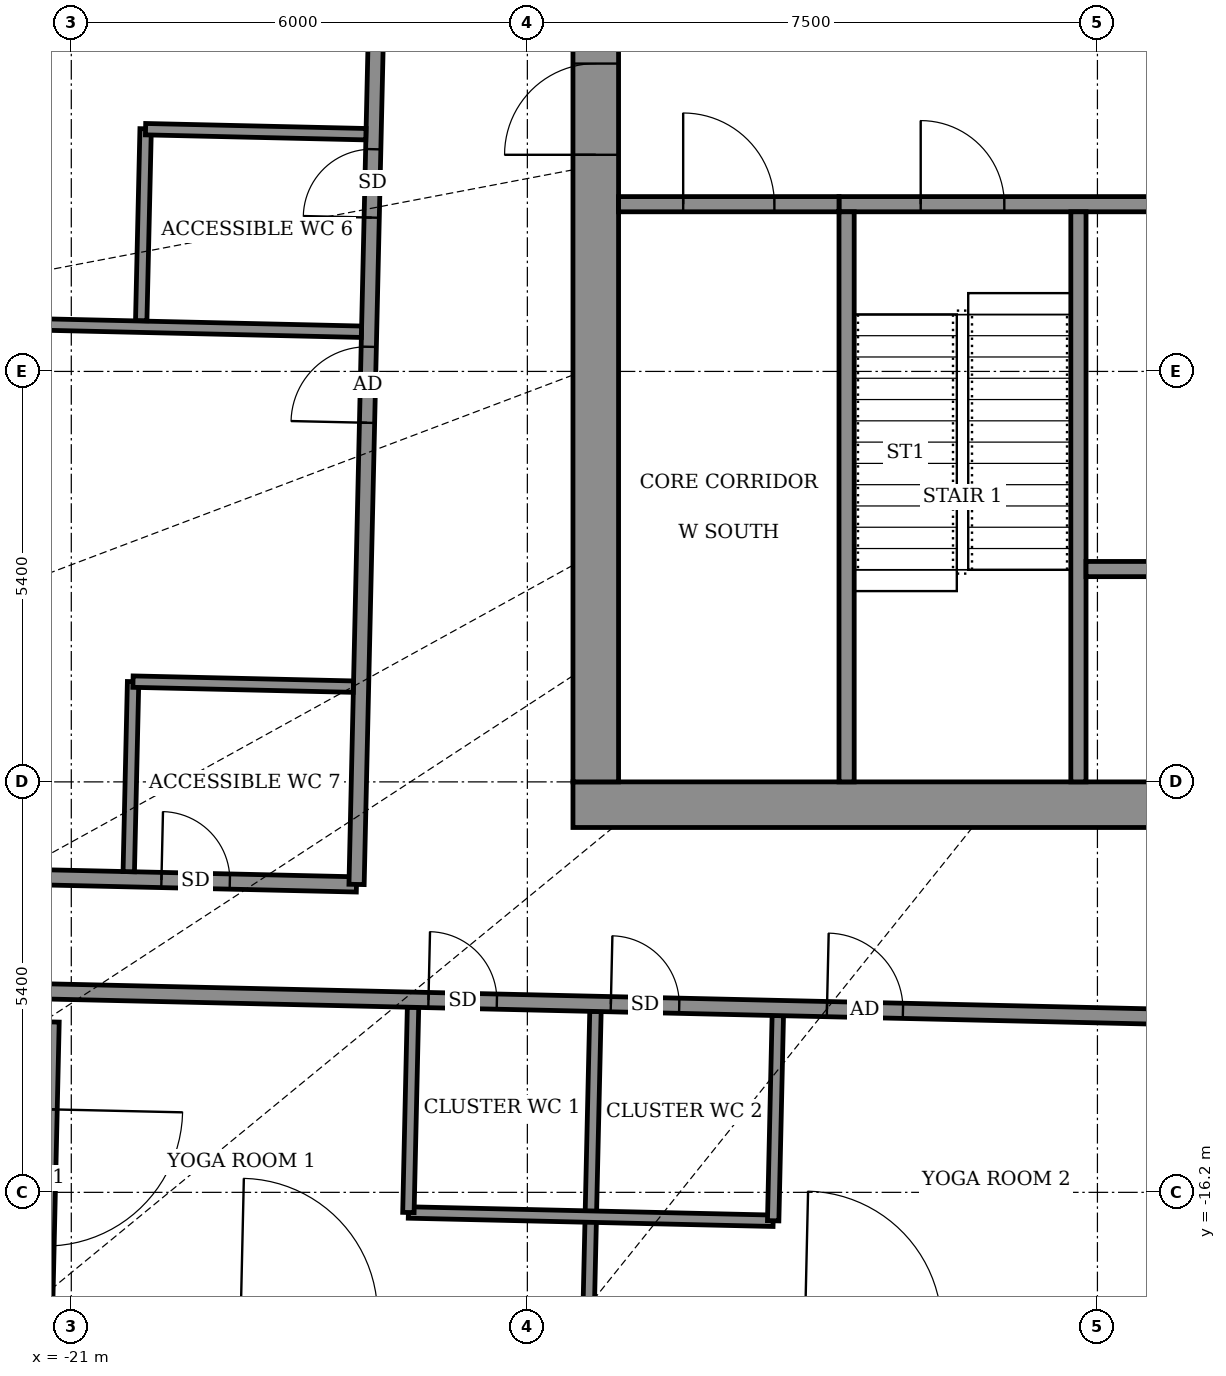
"""IFC4 building model, lengths in metres.
Left out: names, types, materials, properties, quantities, classifications, styles, units other than length and angle.
Written with IfcOpenShell. Run it as: python <this file> out.ifc"""

import sys

from ifc_helpers import new_model, si_unit, direction, frame, frame_2d, origin, place, context, subcontext, project, spatial, rectangle, extrude, element, fill, save


model = new_model("IFC4")
c1 = context("Model", 3, precision=1e-05, world=origin(), true_north=direction((0.0, 1.0)))
c2 = subcontext(c1, "Body", "Model", "MODEL_VIEW")
j1 = project(units=[si_unit("LENGTHUNIT", "METRE"), si_unit("PLANEANGLEUNIT", "RADIAN")], contexts=[c1])
p1 = place(None, origin())
s1 = spatial("IfcSite", under=j1, at=p1, CompositionType="ELEMENT")
p2 = place(p1, origin())
s2 = spatial("IfcBuilding", under=s1, at=p2, CompositionType="ELEMENT")
p3 = place(p2, frame((0.0, 0.0, 337.9)))
s3 = spatial("IfcBuildingStorey", under=s2, at=p3, CompositionType="ELEMENT", Elevation=337.9)
p4 = place(p3, frame((-21.309, -13.957, 0.0), z_axis=(0.0, 0.0, 1.0), x_axis=(-0.022614868993, -0.999744251146, 0.0)))
e1 = element("IfcWall", 1, at=p4, inside=s3, PredefinedType="SOLIDWALL", context=c2, shape_type="SweptSolid", body=[
    extrude(rectangle(XDim=3.8, YDim=0.3, at=frame_2d((1.9, 0.0))), origin(), (0.0, 0.0, 1.0), 2.65),
])
p5 = place(p4, frame((1.15, 0.0, 0.0)))
e2 = element("IfcOpeningElement", 2, at=p5, cuts=e1, PredefinedType="OPENING", context=c2, shape_type="SweptSolid", body=[
    extrude(rectangle(XDim=1.8, YDim=2.4, at=frame_2d((0.9, 1.2))), frame((0.0, 0.16, 0.0), z_axis=(0.0, -1.0, 0.0), x_axis=(1.0, 0.0, 0.0)), (0.0, 0.0, 1.0), 0.32),
])
p6 = place(p3, frame((-14.194, -17.769, 0.0), z_axis=(0.0, 0.0, 1.0), x_axis=(0.022807049009, 0.999739885428, 0.0)))
e3 = element("IfcWall", 3, at=p6, inside=s3, PredefinedType="PARTITIONING", context=c2, shape_type="SweptSolid", body=[
    extrude(rectangle(XDim=3.95, YDim=0.15, at=frame_2d((1.975, 0.0))), origin(), (0.0, 0.0, 1.0), 2.85),
])
p7 = place(p3, frame((-16.565, -16.465, 0.0), z_axis=(0.0, 0.0, 1.0), x_axis=(0.999742675121, -0.022684433919, 0.0)))
e4 = element("IfcWall", 4, at=p7, inside=s3, PredefinedType="PARTITIONING", context=c2, shape_type="SweptSolid", body=[
    extrude(rectangle(XDim=4.8, YDim=0.15, at=frame_2d((2.4, 0.0))), origin(), (0.0, 0.0, 1.0), 2.85),
])
p8 = place(p3, frame((-16.565, -16.465, 0.0), z_axis=(0.0, 0.0, 1.0), x_axis=(0.02260842146, 0.999744396973, 0.0)))
e5 = element("IfcWall", 5, at=p8, inside=s3, PredefinedType="PARTITIONING", context=c2, shape_type="SweptSolid", body=[
    extrude(rectangle(XDim=2.7, YDim=0.15, at=frame_2d((1.35, 0.0))), origin(), (0.0, 0.0, 1.0), 2.65),
])
p9 = place(p3, frame((-11.766, -16.574, 0.0), z_axis=(0.0, 0.0, 1.0), x_axis=(0.02260842146, 0.999744396973, 0.0)))
e6 = element("IfcWall", 6, at=p9, inside=s3, PredefinedType="PARTITIONING", context=c2, shape_type="SweptSolid", body=[
    extrude(rectangle(XDim=2.7, YDim=0.15, at=frame_2d((1.35, 0.0))), origin(), (0.0, 0.0, 1.0), 2.85),
])
p10 = place(p3, frame((-23.849, -13.499, 0.0), z_axis=(0.0, 0.0, 1.0), x_axis=(0.999742429398, -0.022695260756, 0.0)))
e7 = element("IfcWall", 7, at=p10, inside=s3, PredefinedType="PARTITIONING", context=c2, shape_type="SweptSolid", body=[
    extrude(rectangle(XDim=49.0, YDim=0.2, at=frame_2d((24.5, 0.0))), origin(), (0.0, 0.0, 1.0), 2.45),
])
p11 = place(p10, frame((7.55, 0.0, 0.0)))
e8 = element("IfcOpeningElement", 8, at=p11, cuts=e7, PredefinedType="OPENING", context=c2, shape_type="SweptSolid", body=[
    extrude(rectangle(XDim=0.9, YDim=2.1, at=frame_2d((0.45, 1.05))), frame((0.0, 0.11, 0.0), z_axis=(0.0, -1.0, 0.0), x_axis=(1.0, 0.0, 0.0)), (0.0, 0.0, 1.0), 0.22),
])
p12 = place(p10, frame((12.794, 0.0, 0.0)))
e9 = element("IfcOpeningElement", 9, at=p12, cuts=e7, PredefinedType="OPENING", context=c2, shape_type="SweptSolid", body=[
    extrude(rectangle(XDim=1.0, YDim=2.1, at=frame_2d((0.5, 1.05))), frame((0.0, 0.11, 0.0), z_axis=(0.0, -1.0, 0.0), x_axis=(1.0, 0.0, 0.0)), (0.0, 0.0, 1.0), 0.22),
])
p13 = place(p10, frame((9.95, 0.0, 0.0)))
e10 = element("IfcOpeningElement", 10, at=p13, cuts=e7, PredefinedType="OPENING", context=c2, shape_type="SweptSolid", body=[
    extrude(rectangle(XDim=0.9, YDim=2.1, at=frame_2d((0.45, 1.05))), frame((0.0, 0.11, 0.0), z_axis=(0.0, -1.0, 0.0), x_axis=(1.0, 0.0, 0.0)), (0.0, 0.0, 1.0), 0.22),
])
p14 = place(p10, frame((17.45, 0.0, 0.0)))
e11 = element("IfcOpeningElement", 11, at=p14, cuts=e7, PredefinedType="OPENING", context=c2, shape_type="SweptSolid", body=[
    extrude(rectangle(XDim=1.0, YDim=2.1, at=frame_2d((0.5, 1.05))), frame((0.0, 0.11, 0.0), z_axis=(0.0, -1.0, 0.0), x_axis=(1.0, 0.0, 0.0)), (0.0, 0.0, 1.0), 0.22),
])
p15 = place(p10, frame((23.149, 0.0, 0.0)))
e12 = element("IfcOpeningElement", 12, at=p15, cuts=e7, PredefinedType="OPENING", context=c2, shape_type="SweptSolid", body=[
    extrude(rectangle(XDim=1.0, YDim=2.1, at=frame_2d((0.5, 1.05))), frame((0.0, 0.11, 0.0), z_axis=(0.0, -1.0, 0.0), x_axis=(1.0, 0.0, 0.0)), (0.0, 0.0, 1.0), 0.22),
])
p16 = place(p10, frame((29.1, 0.0, 0.0)))
e13 = element("IfcOpeningElement", 13, at=p16, cuts=e7, PredefinedType="OPENING", context=c2, shape_type="SweptSolid", body=[
    extrude(rectangle(XDim=1.0, YDim=2.1, at=frame_2d((0.5, 1.05))), frame((0.0, 0.11, 0.0), z_axis=(0.0, -1.0, 0.0), x_axis=(1.0, 0.0, 0.0)), (0.0, 0.0, 1.0), 0.22),
])
p17 = place(p10, frame((32.5, 0.0, 0.0)))
e14 = element("IfcOpeningElement", 14, at=p17, cuts=e7, PredefinedType="OPENING", context=c2, shape_type="SweptSolid", body=[
    extrude(rectangle(XDim=0.9, YDim=2.1, at=frame_2d((0.45, 1.05))), frame((0.0, 0.11, 0.0), z_axis=(0.0, -1.0, 0.0), x_axis=(1.0, 0.0, 0.0)), (0.0, 0.0, 1.0), 0.22),
])
p18 = place(p10, frame((37.5, 0.0, 0.0)))
e15 = element("IfcOpeningElement", 15, at=p18, cuts=e7, PredefinedType="OPENING", context=c2, shape_type="SweptSolid", body=[
    extrude(rectangle(XDim=1.0, YDim=2.1, at=frame_2d((0.5, 1.05))), frame((0.0, 0.11, 0.0), z_axis=(0.0, -1.0, 0.0), x_axis=(1.0, 0.0, 0.0)), (0.0, 0.0, 1.0), 0.22),
])
p19 = place(p10, frame((34.9, 0.0, 0.0)))
e16 = element("IfcOpeningElement", 16, at=p19, cuts=e7, PredefinedType="OPENING", context=c2, shape_type="SweptSolid", body=[
    extrude(rectangle(XDim=0.9, YDim=2.1, at=frame_2d((0.45, 1.05))), frame((0.0, 0.11, 0.0), z_axis=(0.0, -1.0, 0.0), x_axis=(1.0, 0.0, 0.0)), (0.0, 0.0, 1.0), 0.22),
])
p20 = place(p10, frame((44.213, 0.0, 0.0)))
e17 = element("IfcOpeningElement", 17, at=p20, cuts=e7, PredefinedType="OPENING", context=c2, shape_type="SweptSolid", body=[
    extrude(rectangle(XDim=1.0, YDim=2.1, at=frame_2d((0.5, 1.05))), frame((0.0, 0.11, 0.0), z_axis=(0.0, -1.0, 0.0), x_axis=(1.0, 0.0, 0.0)), (0.0, 0.0, 1.0), 0.22),
])
p21 = place(p10, frame((40.55, 0.0, 0.0)))
e18 = element("IfcOpeningElement", 18, at=p21, cuts=e7, PredefinedType="OPENING", context=c2, shape_type="SweptSolid", body=[
    extrude(rectangle(XDim=0.9, YDim=2.1, at=frame_2d((0.45, 1.05))), frame((0.0, 0.11, 0.0), z_axis=(0.0, -1.0, 0.0), x_axis=(1.0, 0.0, 0.0)), (0.0, 0.0, 1.0), 0.22),
])
p22 = place(p3, frame((-23.815, -12.0, 0.0), z_axis=(0.0, 0.0, 1.0), x_axis=(0.999742947273, -0.022672436532, 0.0)))
e19 = element("IfcWall", 19, at=p22, inside=s3, PredefinedType="PARTITIONING", context=c2, shape_type="SweptSolid", body=[
    extrude(rectangle(XDim=6.569, YDim=0.2, at=frame_2d((3.284, 0.0))), origin(), (0.0, 0.0, 1.0), 2.45),
])
p23 = place(p22, frame((4.002, 0.0, 0.0)))
e20 = element("IfcOpeningElement", 20, at=p23, cuts=e19, PredefinedType="OPENING", context=c2, shape_type="SweptSolid", body=[
    extrude(rectangle(XDim=0.9, YDim=2.1, at=frame_2d((0.45, 1.05))), frame((0.0, 0.11, 0.0), z_axis=(0.0, -1.0, 0.0), x_axis=(1.0, 0.0, 0.0)), (0.0, 0.0, 1.0), 0.22),
])
p24 = place(p3, frame((-20.244, -11.981, 0.0), z_axis=(0.0, 0.0, 1.0), x_axis=(0.02274801823, 0.999741230352, 0.0)))
e21 = element("IfcWall", 21, at=p24, inside=s3, PredefinedType="PARTITIONING", context=c2, shape_type="SweptSolid", body=[
    extrude(rectangle(XDim=2.501, YDim=0.15, at=frame_2d((1.25, 0.0))), origin(), (0.0, 0.0, 1.0), 2.45),
])
p25 = place(p3, frame((-17.247, -12.149, 0.0), z_axis=(0.0, 0.0, 1.0), x_axis=(0.022696191528, 0.999742408268, 0.0)))
e22 = element("IfcWall", 22, at=p25, inside=s3, PredefinedType="PARTITIONING", context=c2, shape_type="SweptSolid", body=[
    extrude(rectangle(XDim=25.074, YDim=0.2, at=frame_2d((12.537, 0.0))), origin(), (0.0, 0.0, 1.0), 2.45),
])
p26 = place(p25, frame((19.097, 0.0, 0.0)))
e23 = element("IfcOpeningElement", 23, at=p26, cuts=e22, PredefinedType="OPENING", context=c2, shape_type="SweptSolid", body=[
    extrude(rectangle(XDim=1.0, YDim=2.1, at=frame_2d((0.5, 1.05))), frame((0.0, 0.11, 0.0), z_axis=(0.0, -1.0, 0.0), x_axis=(1.0, 0.0, 0.0)), (0.0, 0.0, 1.0), 0.22),
])
p27 = place(p25, frame((12.875, 0.0, 0.0)))
e24 = element("IfcOpeningElement", 24, at=p27, cuts=e22, PredefinedType="OPENING", context=c2, shape_type="SweptSolid", body=[
    extrude(rectangle(XDim=1.0, YDim=2.1, at=frame_2d((0.5, 1.05))), frame((0.0, 0.11, 0.0), z_axis=(0.0, -1.0, 0.0), x_axis=(1.0, 0.0, 0.0)), (0.0, 0.0, 1.0), 0.22),
])
p28 = place(p25, frame((8.775, 0.0, 0.0)))
e25 = element("IfcOpeningElement", 25, at=p28, cuts=e22, PredefinedType="OPENING", context=c2, shape_type="SweptSolid", body=[
    extrude(rectangle(XDim=0.9, YDim=2.1, at=frame_2d((0.45, 1.05))), frame((0.0, 0.11, 0.0), z_axis=(0.0, -1.0, 0.0), x_axis=(1.0, 0.0, 0.0)), (0.0, 0.0, 1.0), 0.22),
])
p29 = place(p25, frame((6.075, 0.0, 0.0)))
e26 = element("IfcOpeningElement", 26, at=p29, cuts=e22, PredefinedType="OPENING", context=c2, shape_type="SweptSolid", body=[
    extrude(rectangle(XDim=1.0, YDim=2.1, at=frame_2d((0.5, 1.05))), frame((0.0, 0.11, 0.0), z_axis=(0.0, -1.0, 0.0), x_axis=(1.0, 0.0, 0.0)), (0.0, 0.0, 1.0), 0.22),
])
p30 = place(p3, frame((-20.188, -9.481, 0.0), z_axis=(0.0, 0.0, 1.0), x_axis=(0.999739657619, -0.022817032779, 0.0)))
e27 = element("IfcWall", 27, at=p30, inside=s3, PredefinedType="PARTITIONING", context=c2, shape_type="SweptSolid", body=[
    extrude(rectangle(XDim=2.9, YDim=0.15, at=frame_2d((1.45, 0.0))), origin(), (0.0, 0.0, 1.0), 2.45),
])
p31 = place(p3, frame((-24.75, -4.706, 0.0), z_axis=(0.0, 0.0, 1.0), x_axis=(0.999742135204, -0.022708216532, 0.0)))
e28 = element("IfcWall", 28, at=p31, inside=s3, PredefinedType="PARTITIONING", context=c2, shape_type="SweptSolid", body=[
    extrude(rectangle(XDim=7.569, YDim=0.15, at=frame_2d((3.784, 0.0))), origin(), (0.0, 0.0, 1.0), 2.65),
])
p32 = place(p3, frame((-20.08, -4.732, 0.0), z_axis=(0.0, 0.0, 1.0), x_axis=(0.023015762656, 0.999735102249, 0.0)))
e29 = element("IfcWall", 29, at=p32, inside=s3, PredefinedType="PARTITIONING", context=c2, shape_type="SweptSolid", body=[
    extrude(rectangle(XDim=2.525, YDim=0.15, at=frame_2d((1.262, 0.0))), origin(), (0.0, 0.0, 1.0), 2.65),
])
p33 = place(p3, frame((-20.023, -2.213, 0.0), z_axis=(0.0, 0.0, 1.0), x_axis=(0.999739657619, -0.022817032779, 0.0)))
e30 = element("IfcWall", 30, at=p33, inside=s3, PredefinedType="PARTITIONING", context=c2, shape_type="SweptSolid", body=[
    extrude(rectangle(XDim=2.9, YDim=0.15, at=frame_2d((1.45, 0.0))), origin(), (0.0, 0.0, 1.0), 4.05),
])
p34 = place(p3, frame((-14.4, -11.1, 0.0), z_axis=(0.0, 0.0, 1.0), x_axis=(1.0, 0.0, 0.0)))
e31 = element("IfcWall", 31, at=p34, inside=s3, PredefinedType="SHEAR", context=c2, shape_type="SweptSolid", body=[
    extrude(rectangle(XDim=28.8, YDim=0.6, at=frame_2d((14.4, 0.0))), origin(), (0.0, 0.0, 1.0), 4.6),
])
p35 = place(p3, frame((-14.1, -10.8, 0.0), z_axis=(0.0, 0.0, 1.0), x_axis=(0.0, 1.0, 0.0)))
e32 = element("IfcWall", 32, at=p35, inside=s3, PredefinedType="SHEAR", context=c2, shape_type="SweptSolid", body=[
    extrude(rectangle(XDim=21.6, YDim=0.6, at=frame_2d((10.8, 0.0))), origin(), (0.0, 0.0, 1.0), 4.6),
])
p36 = place(p35, frame((8.25, 0.0, 0.0)))
e33 = element("IfcOpeningElement", 33, at=p36, cuts=e32, PredefinedType="OPENING", context=c2, shape_type="SweptSolid", body=[
    extrude(rectangle(XDim=1.2, YDim=2.1, at=frame_2d((0.6, 1.05))), frame((0.0, 0.31, 0.0), z_axis=(0.0, -1.0, 0.0), x_axis=(1.0, 0.0, 0.0)), (0.0, 0.0, 1.0), 0.62),
])
p37 = place(p35, frame((15.25, 0.0, 0.0)))
e34 = element("IfcOpeningElement", 34, at=p37, cuts=e32, PredefinedType="OPENING", context=c2, shape_type="SweptSolid", body=[
    extrude(rectangle(XDim=1.2, YDim=2.1, at=frame_2d((0.6, 1.05))), frame((0.0, 0.31, 0.0), z_axis=(0.0, -1.0, 0.0), x_axis=(1.0, 0.0, 0.0)), (0.0, 0.0, 1.0), 0.62),
])
p38 = place(p3, frame((-10.9, -3.2, 0.0), z_axis=(0.0, 0.0, 1.0), x_axis=(1.0, 0.0, 0.0)))
e35 = element("IfcWall", 35, at=p38, inside=s3, PredefinedType="SHEAR", context=c2, shape_type="SweptSolid", body=[
    extrude(rectangle(XDim=21.8, YDim=0.2, at=frame_2d((10.9, 0.0))), origin(), (0.0, 0.0, 1.0), 4.05),
])
p39 = place(p38, frame((1.075, 0.0, 0.0)))
e36 = element("IfcOpeningElement", 36, at=p39, cuts=e35, PredefinedType="OPENING", context=c2, shape_type="SweptSolid", body=[
    extrude(rectangle(XDim=1.1, YDim=2.1, at=frame_2d((0.55, 1.05))), frame((0.0, 0.11, 0.0), z_axis=(0.0, -1.0, 0.0), x_axis=(1.0, 0.0, 0.0)), (0.0, 0.0, 1.0), 0.22),
])
p40 = place(p38, frame((10.325, 0.0, 0.0)))
e37 = element("IfcOpeningElement", 37, at=p40, cuts=e35, PredefinedType="OPENING", context=c2, shape_type="SweptSolid", body=[
    extrude(rectangle(XDim=1.1, YDim=2.1, at=frame_2d((0.55, 1.05))), frame((0.0, 0.11, 0.0), z_axis=(0.0, -1.0, 0.0), x_axis=(1.0, 0.0, 0.0)), (0.0, 0.0, 1.0), 0.22),
])
p41 = place(p38, frame((19.625, 0.0, 0.0)))
e38 = element("IfcOpeningElement", 38, at=p41, cuts=e35, PredefinedType="OPENING", context=c2, shape_type="SweptSolid", body=[
    extrude(rectangle(XDim=1.1, YDim=2.1, at=frame_2d((0.55, 1.05))), frame((0.0, 0.11, 0.0), z_axis=(0.0, -1.0, 0.0), x_axis=(1.0, 0.0, 0.0)), (0.0, 0.0, 1.0), 0.22),
])
p42 = place(p38, frame((5.7, 0.0, 0.0)))
e39 = element("IfcOpeningElement", 39, at=p42, cuts=e35, PredefinedType="OPENING", context=c2, shape_type="SweptSolid", body=[
    extrude(rectangle(XDim=1.1, YDim=2.1, at=frame_2d((0.55, 1.05))), frame((0.0, 0.11, 0.0), z_axis=(0.0, -1.0, 0.0), x_axis=(1.0, 0.0, 0.0)), (0.0, 0.0, 1.0), 0.22),
])
p43 = place(p38, frame((14.975, 0.0, 0.0)))
e40 = element("IfcOpeningElement", 40, at=p43, cuts=e35, PredefinedType="OPENING", context=c2, shape_type="SweptSolid", body=[
    extrude(rectangle(XDim=1.1, YDim=2.1, at=frame_2d((0.55, 1.05))), frame((0.0, 0.11, 0.0), z_axis=(0.0, -1.0, 0.0), x_axis=(1.0, 0.0, 0.0)), (0.0, 0.0, 1.0), 0.22),
])
for number, where, z_axis, x_axis in (
    (41, (-10.8, -10.8, 0.0), (0.0, 0.0, 1.0), (0.0, 1.0, 0.0)),
    (42, (-7.75, -10.8, 0.0), (0.0, 0.0, 1.0), (0.0, 1.0, 0.0)),
):
    element("IfcWall", number, at=place(p3, frame(where, z_axis=z_axis, x_axis=x_axis)), inside=s3, PredefinedType="SHEAR", context=c2, shape_type="SweptSolid", body=[
        extrude(rectangle(XDim=7.5, YDim=0.2, at=frame_2d((3.75, 0.0))), origin(), (0.0, 0.0, 1.0), 4.05),
    ])
p44 = place(p3, frame((-7.65, -8.0, 0.0), z_axis=(0.0, 0.0, 1.0), x_axis=(1.0, 0.0, 0.0)))
e43 = element("IfcWall", 43, at=p44, inside=s3, PredefinedType="SHEAR", context=c2, shape_type="SweptSolid", body=[
    extrude(rectangle(XDim=6.0, YDim=0.2, at=frame_2d((3.0, 0.0))), origin(), (0.0, 0.0, 1.0), 4.05),
])
p45 = place(p44, frame((0.9, 0.0, 0.0)))
e44 = element("IfcOpeningElement", 44, at=p45, cuts=e43, PredefinedType="OPENING", context=c2, shape_type="SweptSolid", body=[
    extrude(rectangle(XDim=1.1, YDim=2.1, at=frame_2d((0.55, 1.05))), frame((0.0, 0.11, 0.0), z_axis=(0.0, -1.0, 0.0), x_axis=(1.0, 0.0, 0.0)), (0.0, 0.0, 1.0), 0.22),
])
p46 = place(p44, frame((4.0, 0.0, 0.0)))
e45 = element("IfcOpeningElement", 45, at=p46, cuts=e43, PredefinedType="OPENING", context=c2, shape_type="SweptSolid", body=[
    extrude(rectangle(XDim=1.1, YDim=2.1, at=frame_2d((0.55, 1.05))), frame((0.0, 0.11, 0.0), z_axis=(0.0, -1.0, 0.0), x_axis=(1.0, 0.0, 0.0)), (0.0, 0.0, 1.0), 0.22),
])
p47 = place(p3, frame((-13.8, -3.2, 0.0), z_axis=(0.0, 0.0, 1.0), x_axis=(1.0, 0.0, 0.0)))
e46 = element("IfcWall", 46, at=p47, inside=s3, PredefinedType="STANDARD", context=c2, shape_type="SweptSolid", body=[
    extrude(rectangle(XDim=2.9, YDim=0.2, at=frame_2d((1.45, 0.0))), origin(), (0.0, 0.0, 1.0), 4.05),
])
p48 = place(p47, frame((0.85, 0.0, 0.0)))
e47 = element("IfcOpeningElement", 47, at=p48, cuts=e46, PredefinedType="OPENING", context=c2, shape_type="SweptSolid", body=[
    extrude(rectangle(XDim=1.2, YDim=2.1, at=frame_2d((0.6, 1.05))), frame((0.0, 0.11, 0.0), z_axis=(0.0, -1.0, 0.0), x_axis=(1.0, 0.0, 0.0)), (0.0, 0.0, 1.0), 0.22),
])
p49 = place(p11, origin())
e48 = element("IfcDoor", 48, at=p49, inside=s3, OperationType="SINGLE_SWING_LEFT", PredefinedType="DOOR", context=c2, shape_type="SweptSolid", body=[
    extrude(rectangle(XDim=0.9, YDim=2.1, at=frame_2d((0.45, 1.05))), frame((0.0, 0.025, 0.0), z_axis=(0.0, -1.0, 0.0), x_axis=(1.0, 0.0, 0.0)), (0.0, 0.0, 1.0), 0.05),
])
fill(e8, e48)
p50 = place(p12, origin())
e49 = element("IfcDoor", 49, at=p50, inside=s3, OperationType="SINGLE_SWING_RIGHT", PredefinedType="DOOR", context=c2, shape_type="SweptSolid", body=[
    extrude(rectangle(XDim=1.0, YDim=2.1, at=frame_2d((0.5, 1.05))), frame((0.0, 0.025, 0.0), z_axis=(0.0, -1.0, 0.0), x_axis=(1.0, 0.0, 0.0)), (0.0, 0.0, 1.0), 0.05),
])
fill(e9, e49)
p51 = place(p13, origin())
e50 = element("IfcDoor", 50, at=p51, inside=s3, OperationType="SINGLE_SWING_RIGHT", PredefinedType="DOOR", context=c2, shape_type="SweptSolid", body=[
    extrude(rectangle(XDim=0.9, YDim=2.1, at=frame_2d((0.45, 1.05))), frame((0.0, 0.025, 0.0), z_axis=(0.0, -1.0, 0.0), x_axis=(1.0, 0.0, 0.0)), (0.0, 0.0, 1.0), 0.05),
])
fill(e10, e50)
p52 = place(p28, origin())
e51 = element("IfcDoor", 51, at=p52, inside=s3, OperationType="SINGLE_SWING_RIGHT", PredefinedType="DOOR", context=c2, shape_type="SweptSolid", body=[
    extrude(rectangle(XDim=0.9, YDim=2.1, at=frame_2d((0.45, 1.05))), frame((0.0, 0.025, 0.0), z_axis=(0.0, -1.0, 0.0), x_axis=(1.0, 0.0, 0.0)), (0.0, 0.0, 1.0), 0.05),
])
fill(e25, e51)
p53 = place(p29, origin())
e52 = element("IfcDoor", 52, at=p53, inside=s3, OperationType="SINGLE_SWING_RIGHT", PredefinedType="DOOR", context=c2, shape_type="SweptSolid", body=[
    extrude(rectangle(XDim=1.0, YDim=2.1, at=frame_2d((0.5, 1.05))), frame((0.0, 0.025, 0.0), z_axis=(0.0, -1.0, 0.0), x_axis=(1.0, 0.0, 0.0)), (0.0, 0.0, 1.0), 0.05),
])
fill(e26, e52)
p54 = place(p23, origin())
e53 = element("IfcDoor", 53, at=p54, inside=s3, OperationType="SINGLE_SWING_LEFT", PredefinedType="DOOR", context=c2, shape_type="SweptSolid", body=[
    extrude(rectangle(XDim=0.9, YDim=2.1, at=frame_2d((0.45, 1.05))), frame((0.0, 0.025, 0.0), z_axis=(0.0, -1.0, 0.0), x_axis=(1.0, 0.0, 0.0)), (0.0, 0.0, 1.0), 0.05),
])
fill(e20, e53)
p55 = place(p36, origin())
e54 = element("IfcDoor", 54, at=p55, inside=s3, OperationType="DOUBLE_DOOR_SINGLE_SWING", PredefinedType="DOOR", context=c2, shape_type="SweptSolid", body=[
    extrude(rectangle(XDim=1.2, YDim=2.1, at=frame_2d((0.6, 1.05))), frame((0.0, 0.025, 0.0), z_axis=(0.0, -1.0, 0.0), x_axis=(1.0, 0.0, 0.0)), (0.0, 0.0, 1.0), 0.05),
])
fill(e33, e54)
p56 = place(p39, origin())
e55 = element("IfcDoor", 55, at=p56, inside=s3, OperationType="SINGLE_SWING_RIGHT", PredefinedType="DOOR", context=c2, shape_type="SweptSolid", body=[
    extrude(rectangle(XDim=1.1, YDim=2.1, at=frame_2d((0.55, 1.05))), frame((0.0, 0.025, 0.0), z_axis=(0.0, -1.0, 0.0), x_axis=(1.0, 0.0, 0.0)), (0.0, 0.0, 1.0), 0.05),
])
fill(e36, e55)
p57 = place(p48, origin())
e56 = element("IfcDoor", 56, at=p57, inside=s3, OperationType="SINGLE_SWING_LEFT", PredefinedType="DOOR", context=c2, shape_type="SweptSolid", body=[
    extrude(rectangle(XDim=1.2, YDim=2.1, at=frame_2d((0.6, 1.05))), frame((0.0, 0.025, 0.0), z_axis=(0.0, -1.0, 0.0), x_axis=(1.0, 0.0, 0.0)), (0.0, 0.0, 1.0), 0.05),
])
fill(e47, e56)
save(model, sys.argv[1])
